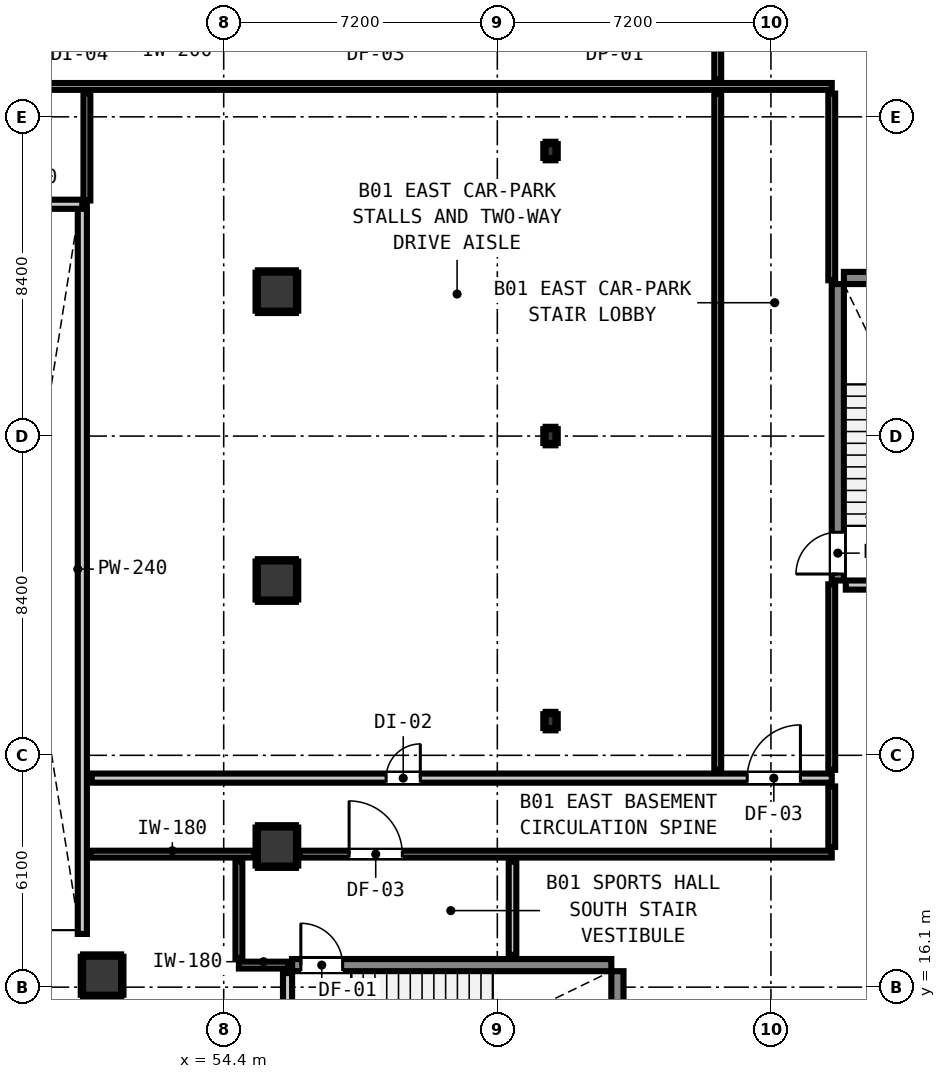
"""IFC4 building model, lengths in metres.
Left out: names, types, materials, properties, quantities, classifications, styles, units other than length and angle.
Written with IfcOpenShell. Run it as: python <this file> out.ifc"""

import sys

from ifc_helpers import new_model, si_unit, direction, frame, frame_2d, origin, origin_2d, place, context, subcontext, project, spatial, rectangle, i_section, extrude, element, fill, save


model = new_model("IFC4")
c1 = context("Model", 3, precision=1e-05, world=origin(), true_north=direction((0.0, 1.0)))
c2 = subcontext(c1, "Body", "Model", "MODEL_VIEW")
j1 = project(units=[si_unit("LENGTHUNIT", "METRE"), si_unit("PLANEANGLEUNIT", "RADIAN")], contexts=[c1])
p1 = place(None, origin())
s1 = spatial("IfcSite", under=j1, at=p1, CompositionType="ELEMENT")
p2 = place(p1, origin())
s2 = spatial("IfcBuilding", under=s1, at=p2, CompositionType="ELEMENT")
p3 = place(p2, frame((0.0, 0.0, -4.4)))
s3 = spatial("IfcBuildingStorey", under=s2, at=p3, CompositionType="ELEMENT", Elevation=-4.4)
p4 = place(p3, frame((64.76, 13.2, 0.0), z_axis=(0.0, 0.0, 1.0), x_axis=(0.0, 1.0, 0.0)))
e1 = element("IfcWall", 1, at=p4, inside=s3, PredefinedType="SHEAR", context=c2, shape_type="SweptSolid", body=[
    extrude(rectangle(XDim=3.32, YDim=0.32, at=frame_2d((1.66, 0.0))), origin(), (0.0, 0.0, 1.0), 4.4),
])
p5 = place(p3, frame((56.2, 16.68, 0.0), z_axis=(0.0, 0.0, 1.0), x_axis=(1.0, 0.0, 0.0)))
e2 = element("IfcWall", 2, at=p5, inside=s3, PredefinedType="SHEAR", context=c2, shape_type="SweptSolid", body=[
    extrude(rectangle(XDim=8.4, YDim=0.32, at=frame_2d((4.2, 0.0))), origin(), (0.0, 0.0, 1.0), 4.4),
])
p6 = place(p5, frame((0.23, 0.0, 0.0)))
e3 = element("IfcOpeningElement", 3, at=p6, cuts=e2, PredefinedType="OPENING", context=c2, shape_type="SweptSolid", body=[
    extrude(rectangle(XDim=1.1, YDim=2.15, at=frame_2d((0.55, 1.075))), frame((0.0, 0.17, 0.0), z_axis=(0.0, -1.0, 0.0), x_axis=(1.0, 0.0, 0.0)), (0.0, 0.0, 1.0), 0.34),
])
p7 = place(p3, frame((70.72, 34.76, 0.0), z_axis=(0.0, 0.0, 1.0), x_axis=(1.0, 0.0, 0.0)))
e4 = element("IfcWall", 4, at=p7, inside=s3, PredefinedType="SHEAR", context=c2, shape_type="SweptSolid", body=[
    extrude(rectangle(XDim=3.08, YDim=0.32, at=frame_2d((1.54, 0.0))), origin(), (0.0, 0.0, 1.0), 4.4),
])
p8 = place(p3, frame((70.56, 26.8, 0.0), z_axis=(0.0, 0.0, 1.0), x_axis=(0.0, 1.0, 0.0)))
e5 = element("IfcWall", 5, at=p8, inside=s3, PredefinedType="SHEAR", context=c2, shape_type="SweptSolid", body=[
    extrude(rectangle(XDim=7.8, YDim=0.32, at=frame_2d((3.9, 0.0))), origin(), (0.0, 0.0, 1.0), 4.4),
])
p9 = place(p8, frame((0.17, 0.0, 0.0)))
e6 = element("IfcOpeningElement", 6, at=p9, cuts=e5, PredefinedType="OPENING", context=c2, shape_type="SweptSolid", body=[
    extrude(rectangle(XDim=1.1, YDim=2.15, at=frame_2d((0.55, 1.075))), frame((0.0, 0.17, 0.0), z_axis=(0.0, -1.0, 0.0), x_axis=(1.0, 0.0, 0.0)), (0.0, 0.0, 1.0), 0.34),
])
for number, where, z_axis, x_axis in (
    (7, (63.0, 23.1, 0.0), (0.0, 0.0, 1.0), (1.0, 0.0, 0.0)),
    (8, (63.0, 30.6, 0.0), (0.0, 0.0, 1.0), (1.0, 0.0, 0.0)),
    (9, (63.0, 38.1, 0.0), (0.0, 0.0, 1.0), (1.0, 0.0, 0.0)),
):
    element("IfcColumn", number, at=place(p3, frame(where, z_axis=z_axis, x_axis=x_axis)), inside=s3, PredefinedType="COLUMN", context=c2, shape_type="SweptSolid", body=[
        extrude(i_section(OverallWidth=0.257, OverallDepth=0.363, WebThickness=0.013, FlangeThickness=0.022, at=origin_2d()), origin(), (0.0, 0.0, 1.0), 4.4),
    ])
p10 = place(p3, frame((51.2, 16.4, 0.0), z_axis=(0.0, 0.0, 1.0), x_axis=(1.0, 0.0, 0.0)))
e10 = element("IfcColumn", 10, at=p10, inside=s3, PredefinedType="COLUMN", context=c2, shape_type="SweptSolid", body=[
    extrude(rectangle(XDim=1.0, YDim=1.0, at=origin_2d()), origin(), (0.0, 0.0, 1.0), 4.32),
])
for number, where, z_axis, x_axis in (
    (11, (55.8, 19.8, 0.0), (0.0, 0.0, 1.0), (1.0, 0.0, 0.0)),
    (12, (55.8, 26.8, 0.0), (0.0, 0.0, 1.0), (1.0, 0.0, 0.0)),
    (13, (55.8, 34.4, 0.0), (0.0, 0.0, 1.0), (1.0, 0.0, 0.0)),
):
    element("IfcColumn", number, at=place(p3, frame(where, z_axis=z_axis, x_axis=x_axis)), inside=s3, PredefinedType="COLUMN", context=c2, shape_type="SweptSolid", body=[
        extrude(rectangle(XDim=1.0, YDim=1.0, at=origin_2d()), origin(), (0.0, 0.0, 1.0), 4.4),
    ])
p11 = place(p3, frame((50.68, 17.5, 0.0), z_axis=(0.0, 0.0, 1.0), x_axis=(0.0, 1.0, 0.0)))
e14 = element("IfcWall", 14, at=p11, inside=s3, PredefinedType="PARAPET", context=c2, shape_type="SweptSolid", body=[
    extrude(rectangle(XDim=19.2, YDim=0.24, at=frame_2d((9.6, 0.0))), origin(), (0.0, 0.0, 1.0), 1.2),
])
p12 = place(p3, frame((47.52, 36.7, 0.0), z_axis=(0.0, 0.0, 1.0), x_axis=(1.0, 0.0, 0.0)))
e15 = element("IfcWall", 15, at=p12, inside=s3, PredefinedType="PARAPET", context=c2, shape_type="SweptSolid", body=[
    extrude(rectangle(XDim=3.16, YDim=0.24, at=frame_2d((1.58, 0.0))), origin(), (0.0, 0.0, 1.0), 1.2),
])
p13 = place(p3, frame((56.08, 14.432, 0.0), z_axis=(0.0, 0.0, 1.0), x_axis=(0.0, 1.0, 0.0)))
e16 = element("IfcWall", 16, at=p13, inside=s3, PredefinedType="PARTITIONING", context=c2, shape_type="SweptSolid", body=[
    extrude(rectangle(XDim=2.038, YDim=0.24, at=frame_2d((1.019, 0.0))), origin(), (0.0, 0.0, 1.0), 3.315),
])
p14 = place(p3, frame((70.77, 26.68, 0.0), z_axis=(0.0, 0.0, 1.0), x_axis=(1.0, 0.0, 0.0)))
e17 = element("IfcWall", 17, at=p14, inside=s3, PredefinedType="PARTITIONING", context=c2, shape_type="SweptSolid", body=[
    extrude(rectangle(XDim=2.98, YDim=0.24, at=frame_2d((1.49, 0.0))), origin(), (0.0, 0.0, 1.0), 3.98),
])
p15 = place(p3, frame((50.928, 21.6, 0.0), z_axis=(0.0, 0.0, 1.0), x_axis=(1.0, 0.0, 0.0)))
e18 = element("IfcWall", 18, at=p15, inside=s3, PredefinedType="PARTITIONING", context=c2, shape_type="SweptSolid", body=[
    extrude(rectangle(XDim=19.472, YDim=0.24, at=frame_2d((9.736, 0.0))), origin(), (0.0, 0.0, 1.0), 3.98),
])
p16 = place(p15, frame((17.248, 0.0, 0.0)))
e19 = element("IfcOpeningElement", 19, at=p16, cuts=e18, PredefinedType="OPENING", context=c2, shape_type="SweptSolid", body=[
    extrude(rectangle(XDim=1.4, YDim=2.15, at=frame_2d((0.7, 1.075))), frame((0.0, 0.13, 0.0), z_axis=(0.0, -1.0, 0.0), x_axis=(1.0, 0.0, 0.0)), (0.0, 0.0, 1.0), 0.26),
])
p17 = place(p15, frame((7.746, 0.0, 0.0)))
e20 = element("IfcOpeningElement", 20, at=p17, cuts=e18, PredefinedType="OPENING", context=c2, shape_type="SweptSolid", body=[
    extrude(rectangle(XDim=0.9, YDim=2.1, at=frame_2d((0.45, 1.05))), frame((0.0, 0.13, 0.0), z_axis=(0.0, -1.0, 0.0), x_axis=(1.0, 0.0, 0.0)), (0.0, 0.0, 1.0), 0.26),
])
p18 = place(p3, frame((54.8, 16.68, 0.0), z_axis=(0.0, 0.0, 1.0), x_axis=(1.0, 0.0, 0.0)))
e21 = element("IfcWall", 21, at=p18, inside=s3, PredefinedType="PARTITIONING", context=c2, shape_type="SweptSolid", body=[
    extrude(rectangle(XDim=1.3, YDim=0.18, at=frame_2d((0.65, 0.0))), origin(), (0.0, 0.0, 1.0), 3.98),
])
p19 = place(p3, frame((50.898, 19.6, 0.0), z_axis=(0.0, 0.0, 1.0), x_axis=(1.0, 0.0, 0.0)))
e22 = element("IfcWall", 22, at=p19, inside=s3, PredefinedType="PARTITIONING", context=c2, shape_type="SweptSolid", body=[
    extrude(rectangle(XDim=4.3, YDim=0.18, at=frame_2d((2.15, 0.0))), origin(), (0.0, 0.0, 1.0), 3.98),
])
p20 = place(p3, frame((56.402, 19.6, 0.0), z_axis=(0.0, 0.0, 1.0), x_axis=(1.0, 0.0, 0.0)))
e23 = element("IfcWall", 23, at=p20, inside=s3, PredefinedType="PARTITIONING", context=c2, shape_type="SweptSolid", body=[
    extrude(rectangle(XDim=13.998, YDim=0.18, at=frame_2d((6.999, 0.0))), origin(), (0.0, 0.0, 1.0), 3.153),
])
p21 = place(p20, frame((1.298, 0.0, 0.0)))
e24 = element("IfcOpeningElement", 24, at=p21, cuts=e23, PredefinedType="OPENING", context=c2, shape_type="SweptSolid", body=[
    extrude(rectangle(XDim=1.4, YDim=2.15, at=frame_2d((0.7, 1.075))), frame((0.0, 0.1, 0.0), z_axis=(0.0, -1.0, 0.0), x_axis=(1.0, 0.0, 0.0)), (0.0, 0.0, 1.0), 0.2),
])
p22 = place(p3, frame((47.302, 39.8, 0.0), z_axis=(0.0, 0.0, 1.0), x_axis=(1.0, 0.0, 0.0)))
e25 = element("IfcWall", 25, at=p22, inside=s3, PredefinedType="PARTITIONING", context=c2, shape_type="SweptSolid", body=[
    extrude(rectangle(XDim=23.098, YDim=0.18, at=frame_2d((11.549, 0.0))), origin(), (0.0, 0.0, 1.0), 3.98),
])
p23 = place(p3, frame((62.0, 16.95, 0.0), z_axis=(0.0, 0.0, 1.0), x_axis=(0.0, 1.0, 0.0)))
e26 = element("IfcWall", 26, at=p23, inside=s3, PredefinedType="PARTITIONING", context=c2, shape_type="SweptSolid", body=[
    extrude(rectangle(XDim=2.452, YDim=0.2, at=frame_2d((1.226, 0.0))), origin(), (0.0, 0.0, 1.0), 3.98),
])
p24 = place(p3, frame((50.8, 36.798, 0.0), z_axis=(0.0, 0.0, 1.0), x_axis=(0.0, 1.0, 0.0)))
e27 = element("IfcWall", 27, at=p24, inside=s3, PredefinedType="PARTITIONING", context=c2, shape_type="SweptSolid", body=[
    extrude(rectangle(XDim=2.814, YDim=0.18, at=frame_2d((1.407, 0.0))), origin(), (0.0, 0.0, 1.0), 3.98),
])
p25 = place(p3, frame((54.8, 16.868, 0.0), z_axis=(0.0, 0.0, 1.0), x_axis=(0.0, 1.0, 0.0)))
e28 = element("IfcWall", 28, at=p25, inside=s3, PredefinedType="PARTITIONING", context=c2, shape_type="SweptSolid", body=[
    extrude(rectangle(XDim=2.544, YDim=0.18, at=frame_2d((1.272, 0.0))), origin(), (0.0, 0.0, 1.0), 3.98),
])
p26 = place(p3, frame((67.4, 21.818, 0.0), z_axis=(0.0, 0.0, 1.0), x_axis=(0.0, 1.0, 0.0)))
e29 = element("IfcWall", 29, at=p26, inside=s3, PredefinedType="PARTITIONING", context=c2, shape_type="SweptSolid", body=[
    extrude(rectangle(XDim=17.794, YDim=0.18, at=frame_2d((8.897, 0.0))), origin(), (0.0, 0.0, 1.0), 3.98),
])
p27 = place(p3, frame((67.4, 39.988, 0.0), z_axis=(0.0, 0.0, 1.0), x_axis=(0.0, 1.0, 0.0)))
e30 = element("IfcWall", 30, at=p27, inside=s3, PredefinedType="PARTITIONING", context=c2, shape_type="SweptSolid", body=[
    extrude(rectangle(XDim=1.414, YDim=0.18, at=frame_2d((0.707, 0.0))), origin(), (0.0, 0.0, 1.0), 3.98),
])
p28 = place(p3, frame((70.4, 19.788, 0.0), z_axis=(0.0, 0.0, 1.0), x_axis=(0.0, 1.0, 0.0)))
e31 = element("IfcWall", 31, at=p28, inside=s3, PredefinedType="PARTITIONING", context=c2, shape_type="SweptSolid", body=[
    extrude(rectangle(XDim=1.594, YDim=0.18, at=frame_2d((0.797, 0.0))), origin(), (0.0, 0.0, 1.0), 3.98),
])
p29 = place(p3, frame((70.4, 21.818, 0.0), z_axis=(0.0, 0.0, 1.0), x_axis=(0.0, 1.0, 0.0)))
e32 = element("IfcWall", 32, at=p29, inside=s3, PredefinedType="PARTITIONING", context=c2, shape_type="SweptSolid", body=[
    extrude(rectangle(XDim=4.882, YDim=0.18, at=frame_2d((2.441, 0.0))), origin(), (0.0, 0.0, 1.0), 3.98),
])
p30 = place(p3, frame((70.4, 34.7, 0.0), z_axis=(0.0, 0.0, 1.0), x_axis=(0.0, 1.0, 0.0)))
e33 = element("IfcWall", 33, at=p30, inside=s3, PredefinedType="PARTITIONING", context=c2, shape_type="SweptSolid", body=[
    extrude(rectangle(XDim=4.912, YDim=0.18, at=frame_2d((2.456, 0.0))), origin(), (0.0, 0.0, 1.0), 3.98),
])
for number, where, z_axis, x_axis in (
    (34, (62.871, 22.887, 0.0), (0.0, 0.0, 1.0), (1.0, 0.0, 0.0)),
    (35, (62.871, 23.314, 0.0), (0.0, 0.0, 1.0), (1.0, 0.0, 0.0)),
):
    element("IfcWall", number, at=place(p3, frame(where, z_axis=z_axis, x_axis=x_axis)), inside=s3, PredefinedType="PARTITIONING", context=c2, shape_type="SweptSolid", body=[
        extrude(rectangle(XDim=0.258, YDim=0.06, at=frame_2d((0.129, 0.0))), origin(), (0.0, 0.0, 1.0), 1.45),
    ])
for number, where, z_axis, x_axis in (
    (36, (62.84, 22.919, 0.0), (0.0, 0.0, 1.0), (0.0, 1.0, 0.0)),
    (37, (63.16, 22.919, 0.0), (0.0, 0.0, 1.0), (0.0, 1.0, 0.0)),
):
    element("IfcWall", number, at=place(p3, frame(where, z_axis=z_axis, x_axis=x_axis)), inside=s3, PredefinedType="PARTITIONING", context=c2, shape_type="SweptSolid", body=[
        extrude(rectangle(XDim=0.363, YDim=0.06, at=frame_2d((0.182, 0.0))), origin(), (0.0, 0.0, 1.0), 1.45),
    ])
for number, where, z_axis, x_axis in (
    (38, (62.871, 30.387, 0.0), (0.0, 0.0, 1.0), (1.0, 0.0, 0.0)),
    (39, (62.871, 30.814, 0.0), (0.0, 0.0, 1.0), (1.0, 0.0, 0.0)),
):
    element("IfcWall", number, at=place(p3, frame(where, z_axis=z_axis, x_axis=x_axis)), inside=s3, PredefinedType="PARTITIONING", context=c2, shape_type="SweptSolid", body=[
        extrude(rectangle(XDim=0.258, YDim=0.06, at=frame_2d((0.129, 0.0))), origin(), (0.0, 0.0, 1.0), 1.45),
    ])
for number, where, z_axis, x_axis in (
    (40, (62.84, 30.419, 0.0), (0.0, 0.0, 1.0), (0.0, 1.0, 0.0)),
    (41, (63.16, 30.419, 0.0), (0.0, 0.0, 1.0), (0.0, 1.0, 0.0)),
):
    element("IfcWall", number, at=place(p3, frame(where, z_axis=z_axis, x_axis=x_axis)), inside=s3, PredefinedType="PARTITIONING", context=c2, shape_type="SweptSolid", body=[
        extrude(rectangle(XDim=0.363, YDim=0.06, at=frame_2d((0.182, 0.0))), origin(), (0.0, 0.0, 1.0), 1.45),
    ])
for number, where, z_axis, x_axis in (
    (42, (62.871, 37.886, 0.0), (0.0, 0.0, 1.0), (1.0, 0.0, 0.0)),
    (43, (62.871, 38.314, 0.0), (0.0, 0.0, 1.0), (1.0, 0.0, 0.0)),
):
    element("IfcWall", number, at=place(p3, frame(where, z_axis=z_axis, x_axis=x_axis)), inside=s3, PredefinedType="PARTITIONING", context=c2, shape_type="SweptSolid", body=[
        extrude(rectangle(XDim=0.258, YDim=0.06, at=frame_2d((0.129, 0.0))), origin(), (0.0, 0.0, 1.0), 1.45),
    ])
for number, where, z_axis, x_axis in (
    (44, (62.84, 37.919, 0.0), (0.0, 0.0, 1.0), (0.0, 1.0, 0.0)),
    (45, (63.16, 37.919, 0.0), (0.0, 0.0, 1.0), (0.0, 1.0, 0.0)),
):
    element("IfcWall", number, at=place(p3, frame(where, z_axis=z_axis, x_axis=x_axis)), inside=s3, PredefinedType="PARTITIONING", context=c2, shape_type="SweptSolid", body=[
        extrude(rectangle(XDim=0.363, YDim=0.06, at=frame_2d((0.182, 0.0))), origin(), (0.0, 0.0, 1.0), 1.45),
    ])
for number, where, z_axis, x_axis in (
    (46, (50.7, 15.868, 0.0), (0.0, 0.0, 1.0), (1.0, 0.0, 0.0)),
    (47, (50.7, 16.932, 0.0), (0.0, 0.0, 1.0), (1.0, 0.0, 0.0)),
    (48, (50.668, 15.9, 0.0), (0.0, 0.0, 1.0), (0.0, 1.0, 0.0)),
    (49, (51.732, 15.9, 0.0), (0.0, 0.0, 1.0), (0.0, 1.0, 0.0)),
    (50, (55.3, 19.268, 0.0), (0.0, 0.0, 1.0), (1.0, 0.0, 0.0)),
    (51, (55.3, 20.332, 0.0), (0.0, 0.0, 1.0), (1.0, 0.0, 0.0)),
    (52, (55.268, 19.3, 0.0), (0.0, 0.0, 1.0), (0.0, 1.0, 0.0)),
    (53, (56.332, 19.3, 0.0), (0.0, 0.0, 1.0), (0.0, 1.0, 0.0)),
    (54, (55.3, 26.268, 0.0), (0.0, 0.0, 1.0), (1.0, 0.0, 0.0)),
    (55, (55.3, 27.332, 0.0), (0.0, 0.0, 1.0), (1.0, 0.0, 0.0)),
    (56, (55.268, 26.3, 0.0), (0.0, 0.0, 1.0), (0.0, 1.0, 0.0)),
    (57, (56.332, 26.3, 0.0), (0.0, 0.0, 1.0), (0.0, 1.0, 0.0)),
    (58, (55.3, 33.868, 0.0), (0.0, 0.0, 1.0), (1.0, 0.0, 0.0)),
    (59, (55.3, 34.932, 0.0), (0.0, 0.0, 1.0), (1.0, 0.0, 0.0)),
    (60, (55.268, 33.9, 0.0), (0.0, 0.0, 1.0), (0.0, 1.0, 0.0)),
    (61, (56.332, 33.9, 0.0), (0.0, 0.0, 1.0), (0.0, 1.0, 0.0)),
):
    element("IfcWall", number, at=place(p3, frame(where, z_axis=z_axis, x_axis=x_axis)), inside=s3, PredefinedType="PARTITIONING", context=c2, shape_type="SweptSolid", body=[
        extrude(rectangle(XDim=1.0, YDim=0.06, at=frame_2d((0.5, 0.0))), origin(), (0.0, 0.0, 1.0), 1.45),
    ])
p31 = place(p6, origin())
e62 = element("IfcDoor", 62, at=p31, inside=s3, OperationType="SINGLE_SWING_LEFT", PredefinedType="DOOR", context=c2, shape_type="SweptSolid", body=[
    extrude(rectangle(XDim=1.1, YDim=2.15, at=frame_2d((0.55, 1.075))), frame((0.0, 0.025, 0.0), z_axis=(0.0, -1.0, 0.0), x_axis=(1.0, 0.0, 0.0)), (0.0, 0.0, 1.0), 0.05),
])
fill(e3, e62)
p32 = place(p9, origin())
e63 = element("IfcDoor", 63, at=p32, inside=s3, OperationType="SINGLE_SWING_LEFT", PredefinedType="DOOR", context=c2, shape_type="SweptSolid", body=[
    extrude(rectangle(XDim=1.1, YDim=2.15, at=frame_2d((0.55, 1.075))), frame((0.0, 0.025, 0.0), z_axis=(0.0, -1.0, 0.0), x_axis=(1.0, 0.0, 0.0)), (0.0, 0.0, 1.0), 0.05),
])
fill(e6, e63)
p33 = place(p16, origin())
e64 = element("IfcDoor", 64, at=p33, inside=s3, OperationType="SINGLE_SWING_RIGHT", PredefinedType="DOOR", context=c2, shape_type="SweptSolid", body=[
    extrude(rectangle(XDim=1.4, YDim=2.15, at=frame_2d((0.7, 1.075))), frame((0.0, 0.025, 0.0), z_axis=(0.0, -1.0, 0.0), x_axis=(1.0, 0.0, 0.0)), (0.0, 0.0, 1.0), 0.05),
])
fill(e19, e64)
p34 = place(p21, origin())
e65 = element("IfcDoor", 65, at=p34, inside=s3, OperationType="SINGLE_SWING_LEFT", PredefinedType="DOOR", context=c2, shape_type="SweptSolid", body=[
    extrude(rectangle(XDim=1.4, YDim=2.15, at=frame_2d((0.7, 1.075))), frame((0.0, 0.025, 0.0), z_axis=(0.0, -1.0, 0.0), x_axis=(1.0, 0.0, 0.0)), (0.0, 0.0, 1.0), 0.05),
])
fill(e24, e65)
p35 = place(p17, origin())
e66 = element("IfcDoor", 66, at=p35, inside=s3, OperationType="SINGLE_SWING_RIGHT", PredefinedType="DOOR", context=c2, shape_type="SweptSolid", body=[
    extrude(rectangle(XDim=0.9, YDim=2.1, at=frame_2d((0.45, 1.05))), frame((0.0, 0.025, 0.0), z_axis=(0.0, -1.0, 0.0), x_axis=(1.0, 0.0, 0.0)), (0.0, 0.0, 1.0), 0.05),
])
fill(e20, e66)
save(model, sys.argv[1])
